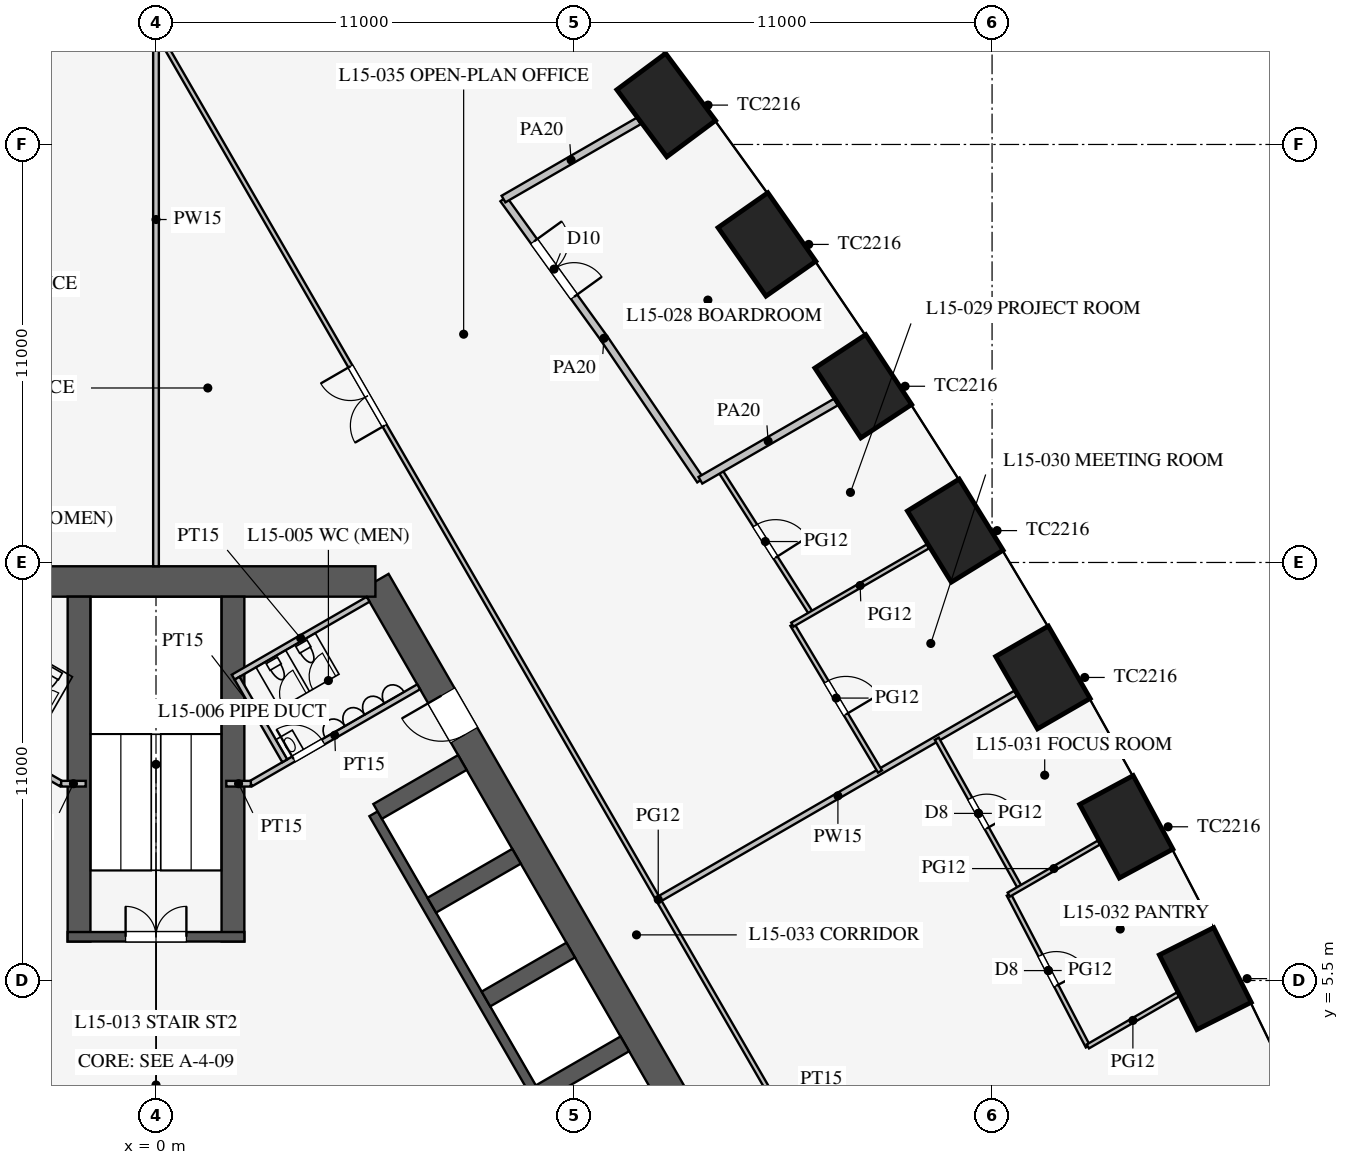
"""IFC4 building model, lengths in metres.
Left out: names, types, materials, properties, quantities, classifications, styles, units other than length and angle.
Written with IfcOpenShell. Run it as: python <this file> out.ifc"""

import sys

from ifc_helpers import new_model, si_unit, direction, frame, frame_2d, origin, origin_2d, place, context, subcontext, project, spatial, rectangle, extrude, element, fill, save


model = new_model("IFC4")
c1 = context("Model", 3, precision=1e-05, world=origin(), true_north=direction((0.0, 1.0)))
c2 = subcontext(c1, "Body", "Model", "MODEL_VIEW")
j1 = project(units=[si_unit("LENGTHUNIT", "METRE"), si_unit("PLANEANGLEUNIT", "RADIAN")], contexts=[c1])
p1 = place(None, origin())
s1 = spatial("IfcSite", under=j1, at=p1, CompositionType="ELEMENT")
p2 = place(p1, origin())
s2 = spatial("IfcBuilding", under=s1, at=p2, CompositionType="ELEMENT")
p3 = place(p2, frame((0.0, 0.0, 66.9)))
s3 = spatial("IfcBuildingStorey", under=s2, at=p3, CompositionType="ELEMENT", Elevation=66.9)
for number, where, z_axis, x_axis in (
    (1, (29.576, 1.487, 0.0), (0.0, 0.0, 1.0), (-0.423, 0.906, 0.0)),
    (2, (27.611, 5.549, 0.0), (0.0, 0.0, 1.0), (-0.449, 0.894, 0.0)),
    (3, (25.531, 9.544, 0.0), (0.0, 0.0, 1.0), (-0.475, 0.88, 0.0)),
    (4, (23.338, 13.474, 0.0), (0.0, 0.0, 1.0), (-0.5, 0.866, 0.0)),
    (5, (21.031, 17.339, 0.0), (0.0, 0.0, 1.0), (-0.525, 0.851, 0.0)),
    (6, (18.611, 21.137, 0.0), (0.0, 0.0, 1.0), (-0.549, 0.836, 0.0)),
    (7, (16.076, 24.87, 0.0), (0.0, 0.0, 1.0), (-0.574, 0.819, 0.0)),
    (8, (13.426, 28.536, 0.0), (0.0, 0.0, 1.0), (-0.597, 0.802, 0.0)),
):
    element("IfcColumn", number, at=place(p3, frame(where, z_axis=z_axis, x_axis=x_axis)), inside=s3, PredefinedType="COLUMN", context=c2, shape_type="SweptSolid", body=[
        extrude(rectangle(XDim=2.2, YDim=1.6, at=origin_2d()), origin(), (0.0, 0.0, 1.0), 4.2),
    ])
p4 = place(p3, frame((16.743, -3.0, 0.0), z_axis=(0.0, 0.0, 1.0), x_axis=(-0.500002442456, 0.866023993627, 0.0)))
e9 = element("IfcWall", 9, at=p4, inside=s3, PredefinedType="SHEAR", context=c2, shape_type="SweptSolid", body=[
    extrude(rectangle(XDim=21.939, YDim=0.8, at=frame_2d((10.97, 0.0))), origin(), (0.0, 0.0, 1.0), 4.2),
])
p5 = place(p4, frame((17.27, 0.0, 0.0)))
e10 = element("IfcOpeningElement", 10, at=p5, cuts=e9, PredefinedType="OPENING", context=c2, shape_type="SweptSolid", body=[
    extrude(rectangle(XDim=1.2, YDim=2.1, at=frame_2d((0.6, 1.05))), frame((0.0, 0.41, 0.0), z_axis=(0.0, -1.0, 0.0), x_axis=(1.0, 0.0, 0.0)), (0.0, 0.0, 1.0), 0.82),
])
p6 = place(p4, frame((3.47, 0.0, 0.0)))
e11 = element("IfcOpeningElement", 11, at=p6, cuts=e9, PredefinedType="OPENING", context=c2, shape_type="SweptSolid", body=[
    extrude(rectangle(XDim=1.2, YDim=2.1, at=frame_2d((0.6, 1.05))), frame((0.0, 0.41, 0.0), z_axis=(0.0, -1.0, 0.0), x_axis=(1.0, 0.0, 0.0)), (0.0, 0.0, 1.0), 0.82),
])
p7 = place(p3, frame((5.773, 16.0, 0.0), z_axis=(0.0, 0.0, 1.0), x_axis=(-1.0, 0.0, 0.0)))
e12 = element("IfcWall", 12, at=p7, inside=s3, PredefinedType="SHEAR", context=c2, shape_type="SweptSolid", body=[
    extrude(rectangle(XDim=11.547, YDim=0.8, at=frame_2d((5.773, 0.0))), origin(), (0.0, 0.0, 1.0), 4.2),
])
p8 = place(p3, frame((11.424, 0.014, 0.0), z_axis=(0.0, 0.0, 1.0), x_axis=(-0.500001763848, 0.866024385424, 0.0)))
e13 = element("IfcWall", 13, at=p8, inside=s3, PredefinedType="SHEAR", context=c2, shape_type="SweptSolid", body=[
    extrude(rectangle(XDim=11.4, YDim=0.25, at=frame_2d((5.7, 0.0))), origin(), (0.0, 0.0, 1.0), 4.2),
])
for number, where, z_axis, x_axis in (
    (14, (10.107, 2.544, 0.0), (0.0, 0.0, 1.0), (0.866, 0.5, 0.0)),
    (15, (8.682, 5.012, 0.0), (0.0, 0.0, 1.0), (0.866, 0.5, 0.0)),
    (16, (7.257, 7.481, 0.0), (0.0, 0.0, 1.0), (0.866, 0.5, 0.0)),
):
    element("IfcWall", number, at=place(p3, frame(where, z_axis=z_axis, x_axis=x_axis)), inside=s3, PredefinedType="SHEAR", context=c2, shape_type="SweptSolid", body=[
        extrude(rectangle(XDim=2.575, YDim=0.45, at=frame_2d((1.288, 0.0))), origin(), (0.0, 0.0, 1.0), 4.2),
    ])
p9 = place(p3, frame((5.832, 9.949, 0.0), z_axis=(0.0, 0.0, 1.0), x_axis=(0.866029291668, 0.499993265928, 0.0)))
e17 = element("IfcWall", 17, at=p9, inside=s3, PredefinedType="SHEAR", context=c2, shape_type="SweptSolid", body=[
    extrude(rectangle(XDim=2.575, YDim=0.45, at=frame_2d((1.288, 0.0))), origin(), (0.0, 0.0, 1.0), 4.2),
])
for number, where, z_axis, x_axis in (
    (18, (2.025, 6.525, 0.0), (0.0, 0.0, 1.0), (0.0, 1.0, 0.0)),
    (19, (-2.025, 6.525, 0.0), (0.0, 0.0, 1.0), (0.0, 1.0, 0.0)),
):
    element("IfcWall", number, at=place(p3, frame(where, z_axis=z_axis, x_axis=x_axis)), inside=s3, PredefinedType="SHEAR", context=c2, shape_type="SweptSolid", body=[
        extrude(rectangle(XDim=9.075, YDim=0.6, at=frame_2d((4.538, 0.0))), origin(), (0.0, 0.0, 1.0), 4.2),
    ])
p10 = place(p3, frame((2.325, 6.65, 0.0), z_axis=(0.0, 0.0, 1.0), x_axis=(-1.0, 0.0, 0.0)))
e20 = element("IfcWall", 20, at=p10, inside=s3, PredefinedType="SHEAR", context=c2, shape_type="SweptSolid", body=[
    extrude(rectangle(XDim=4.65, YDim=0.25, at=frame_2d((2.325, 0.0))), origin(), (0.0, 0.0, 1.0), 4.2),
])
p11 = place(p10, frame((1.525, 0.0, 0.0)))
e21 = element("IfcOpeningElement", 21, at=p11, cuts=e20, PredefinedType="OPENING", context=c2, shape_type="SweptSolid", body=[
    extrude(rectangle(XDim=1.6, YDim=2.1, at=frame_2d((0.8, 1.05))), frame((0.0, 0.135, 0.0), z_axis=(0.0, -1.0, 0.0), x_axis=(1.0, 0.0, 0.0)), (0.0, 0.0, 1.0), 0.27),
])
p12 = place(p3, frame((2.495, 10.678, 0.0), z_axis=(0.0, 0.0, 1.0), x_axis=(0.86602216432, 0.500005610874, 0.0)))
e22 = element("IfcWall", 22, at=p12, inside=s3, PredefinedType="PARTITIONING", context=c2, shape_type="SweptSolid", body=[
    extrude(rectangle(XDim=5.1, YDim=0.15, at=frame_2d((2.55, 0.0))), origin(), (0.0, 0.0, 1.0), 4.0),
])
p13 = place(p12, frame((1.3, 0.0, 0.0)))
e23 = element("IfcOpeningElement", 23, at=p13, cuts=e22, PredefinedType="OPENING", context=c2, shape_type="SweptSolid", body=[
    extrude(rectangle(XDim=0.9, YDim=2.1, at=frame_2d((0.45, 1.05))), frame((0.0, 0.085, 0.0), z_axis=(0.0, -1.0, 0.0), x_axis=(1.0, 0.0, 0.0)), (0.0, 0.0, 1.0), 0.17),
])
p14 = place(p3, frame((-2.495, 10.678, 0.0), z_axis=(0.0, 0.0, 1.0), x_axis=(-0.86602216432, 0.500005610874, 0.0)))
e24 = element("IfcWall", 24, at=p14, inside=s3, PredefinedType="PARTITIONING", context=c2, shape_type="SweptSolid", body=[
    extrude(rectangle(XDim=5.1, YDim=0.15, at=frame_2d((2.55, 0.0))), origin(), (0.0, 0.0, 1.0), 4.0),
])
p15 = place(p14, frame((2.6, 0.0, 0.0)))
e25 = element("IfcOpeningElement", 25, at=p15, cuts=e24, PredefinedType="OPENING", context=c2, shape_type="SweptSolid", body=[
    extrude(rectangle(XDim=0.9, YDim=2.1, at=frame_2d((0.45, 1.05))), frame((0.0, 0.085, 0.0), z_axis=(0.0, -1.0, 0.0), x_axis=(1.0, 0.0, 0.0)), (0.0, 0.0, 1.0), 0.17),
])
for number, where, z_axis, x_axis in (
    (26, (2.495, 10.678, 0.0), (0.0, 0.0, 1.0), (-1.0, 0.0, 0.0)),
    (27, (-2.495, 10.678, 0.0), (0.0, 0.0, 1.0), (1.0, 0.0, 0.0)),
):
    element("IfcWall", number, at=place(p3, frame(where, z_axis=z_axis, x_axis=x_axis)), inside=s3, PredefinedType="PARTITIONING", context=c2, shape_type="SweptSolid", body=[
        extrude(rectangle(XDim=0.645, YDim=0.15, at=frame_2d((0.323, 0.0))), origin(), (0.0, 0.0, 1.0), 4.0),
    ])
p16 = place(p3, frame((2.031, 13.482, 0.0), z_axis=(0.0, 0.0, 1.0), x_axis=(0.866050731258, 0.499956128963, 0.0)))
e28 = element("IfcWall", 28, at=p16, inside=s3, PredefinedType="PARTITIONING", context=c2, shape_type="SweptSolid", body=[
    extrude(rectangle(XDim=4.1, YDim=0.15, at=frame_2d((2.05, 0.0))), origin(), (0.0, 0.0, 1.0), 4.0),
])
p17 = place(p3, frame((3.389, 11.281, 0.0), z_axis=(0.0, 0.0, 1.0), x_axis=(-0.499989096993, 0.866031698547, 0.0)))
e29 = element("IfcWall", 29, at=p17, inside=s3, PredefinedType="PARTITIONING", context=c2, shape_type="SweptSolid", body=[
    extrude(rectangle(XDim=2.51, YDim=0.15, at=frame_2d((1.255, 0.0))), origin(), (0.0, 0.0, 1.0), 4.0),
])
p18 = place(p3, frame((0.0, 16.4, 0.0), z_axis=(0.0, 0.0, 1.0), x_axis=(0.0, 1.0, 0.0)))
e30 = element("IfcWall", 30, at=p18, inside=s3, PredefinedType="PARTITIONING", context=c2, shape_type="SweptSolid", body=[
    extrude(rectangle(XDim=18.25, YDim=0.15, at=frame_2d((9.125, 0.0))), origin(), (0.0, 0.0, 1.0), 2.3),
])
p19 = place(p3, frame((13.268, 7.66, 0.0), z_axis=(0.0, 0.0, 1.0), x_axis=(0.866019550038, 0.50001013885, 0.0)))
e31 = element("IfcWall", 31, at=p19, inside=s3, PredefinedType="PARTITIONING", context=c2, shape_type="SweptSolid", body=[
    extrude(rectangle(XDim=10.799, YDim=0.15, at=frame_2d((5.399, 0.0))), origin(), (0.0, 0.0, 1.0), 2.8),
])
p20 = place(p3, frame((26.415, -15.231, 0.0), z_axis=(0.0, 0.0, 1.0), x_axis=(-0.50000091641, 0.866024874695, 0.0)))
e32 = element("IfcWall", 32, at=p20, inside=s3, PredefinedType="PARTITIONING", context=c2, shape_type="SweptSolid", body=[
    extrude(rectangle(XDim=52.796, YDim=0.12, at=frame_2d((26.398, 0.0))), origin(), (0.0, 0.0, 1.0), 2.9),
])
p21 = place(p20, frame((10.2, 0.0, 0.15)))
e33 = element("IfcOpeningElement", 33, at=p21, cuts=e32, PredefinedType="OPENING", context=c2, shape_type="SweptSolid", body=[
    extrude(rectangle(XDim=1.8, YDim=2.1, at=frame_2d((0.9, 1.05))), frame((0.0, 0.07, 0.0), z_axis=(0.0, -1.0, 0.0), x_axis=(1.0, 0.0, 0.0)), (0.0, 0.0, 1.0), 0.14),
])
p22 = place(p20, frame((40.8, 0.0, 0.15)))
e34 = element("IfcOpeningElement", 34, at=p22, cuts=e32, PredefinedType="OPENING", context=c2, shape_type="SweptSolid", body=[
    extrude(rectangle(XDim=1.8, YDim=2.1, at=frame_2d((0.9, 1.05))), frame((0.0, 0.07, 0.0), z_axis=(0.0, -1.0, 0.0), x_axis=(1.0, 0.0, 0.0)), (0.0, 0.0, 1.0), 0.14),
])
p23 = place(p3, frame((19.052, 10.999, 0.0), z_axis=(0.0, 0.0, 1.0), x_axis=(-0.51252396108, 0.858672923364, 0.0)))
e35 = element("IfcWall", 35, at=p23, inside=s3, PredefinedType="PARTITIONING", context=c2, shape_type="SweptSolid", body=[
    extrude(rectangle(XDim=4.5, YDim=0.12, at=frame_2d((2.25, 0.0))), origin(), (0.0, 0.0, 1.0), 2.9),
])
p24 = place(p23, frame((1.75, 0.0, 0.15)))
e36 = element("IfcOpeningElement", 36, at=p24, cuts=e35, PredefinedType="OPENING", context=c2, shape_type="SweptSolid", body=[
    extrude(rectangle(XDim=1.0, YDim=2.1, at=frame_2d((0.5, 1.05))), frame((0.0, 0.07, 0.0), z_axis=(0.0, -1.0, 0.0), x_axis=(1.0, 0.0, 0.0)), (0.0, 0.0, 1.0), 0.14),
])
p25 = place(p3, frame((11.792, 22.396, 0.0), z_axis=(0.0, 0.0, 1.0), x_axis=(-0.585376255171, 0.810761765183, 0.0)))
e37 = element("IfcWall", 37, at=p25, inside=s3, PredefinedType="PARTITIONING", context=c2, shape_type="SweptSolid", body=[
    extrude(rectangle(XDim=4.523, YDim=0.2, at=frame_2d((2.262, 0.0))), origin(), (0.0, 0.0, 1.0), 2.9),
])
p26 = place(p25, frame((1.35, 0.0, 0.15)))
e38 = element("IfcOpeningElement", 38, at=p26, cuts=e37, PredefinedType="OPENING", context=c2, shape_type="SweptSolid", body=[
    extrude(rectangle(XDim=1.8, YDim=2.1, at=frame_2d((0.9, 1.05))), frame((0.0, 0.11, 0.0), z_axis=(0.0, -1.0, 0.0), x_axis=(1.0, 0.0, 0.0)), (0.0, 0.0, 1.0), 0.22),
])
p27 = place(p3, frame((17.243, 15.151, 0.0), z_axis=(0.0, 0.0, 1.0), x_axis=(-0.537243691336, 0.843427066272, 0.0)))
e39 = element("IfcWall", 39, at=p27, inside=s3, PredefinedType="PARTITIONING", context=c2, shape_type="SweptSolid", body=[
    extrude(rectangle(XDim=4.504, YDim=0.12, at=frame_2d((2.252, 0.0))), origin(), (0.0, 0.0, 1.0), 2.9),
])
p28 = place(p27, frame((1.75, 0.0, 0.15)))
e40 = element("IfcOpeningElement", 40, at=p28, cuts=e39, PredefinedType="OPENING", context=c2, shape_type="SweptSolid", body=[
    extrude(rectangle(XDim=1.0, YDim=2.1, at=frame_2d((0.5, 1.05))), frame((0.0, 0.07, 0.0), z_axis=(0.0, -1.0, 0.0), x_axis=(1.0, 0.0, 0.0)), (0.0, 0.0, 1.0), 0.14),
])
p29 = place(p3, frame((14.325, 18.663, 0.0), z_axis=(0.0, 0.0, 1.0), x_axis=(-0.561512004239, 0.827468591002, 0.0)))
e41 = element("IfcWall", 41, at=p29, inside=s3, PredefinedType="PARTITIONING", context=c2, shape_type="SweptSolid", body=[
    extrude(rectangle(XDim=4.512, YDim=0.2, at=frame_2d((2.256, 0.0))), origin(), (0.0, 0.0, 1.0), 2.9),
])
p30 = place(p3, frame((22.739, 7.932, 0.0), z_axis=(0.0, 0.0, 1.0), x_axis=(-0.487373854787, 0.873193406795, 0.0)))
e42 = element("IfcWall", 42, at=p30, inside=s3, PredefinedType="PARTITIONING", context=c2, shape_type="SweptSolid", body=[
    extrude(rectangle(XDim=4.5, YDim=0.12, at=frame_2d((2.25, 0.0))), origin(), (0.0, 0.0, 1.0), 2.9),
])
p31 = place(p30, frame((1.8, 0.0, 0.15)))
e43 = element("IfcOpeningElement", 43, at=p31, cuts=e42, PredefinedType="OPENING", context=c2, shape_type="SweptSolid", body=[
    extrude(rectangle(XDim=0.9, YDim=2.1, at=frame_2d((0.45, 1.05))), frame((0.0, 0.07, 0.0), z_axis=(0.0, -1.0, 0.0), x_axis=(1.0, 0.0, 0.0)), (0.0, 0.0, 1.0), 0.14),
])
p32 = place(p3, frame((24.52, 3.764, 0.0), z_axis=(0.0, 0.0, 1.0), x_axis=(-0.461852697957, 0.886956642339, 0.0)))
e44 = element("IfcWall", 44, at=p32, inside=s3, PredefinedType="PARTITIONING", context=c2, shape_type="SweptSolid", body=[
    extrude(rectangle(XDim=4.504, YDim=0.12, at=frame_2d((2.252, 0.0))), origin(), (0.0, 0.0, 1.0), 2.9),
])
p33 = place(p32, frame((1.8, 0.0, 0.15)))
e45 = element("IfcOpeningElement", 45, at=p33, cuts=e44, PredefinedType="OPENING", context=c2, shape_type="SweptSolid", body=[
    extrude(rectangle(XDim=0.9, YDim=2.1, at=frame_2d((0.45, 1.05))), frame((0.0, 0.07, 0.0), z_axis=(0.0, -1.0, 0.0), x_axis=(1.0, 0.0, 0.0)), (0.0, 0.0, 1.0), 0.14),
])
p34 = place(p3, frame((9.144, 26.064, 0.0), z_axis=(0.0, 0.0, 1.0), x_axis=(0.866022320763, 0.500005339912, 0.0)))
e46 = element("IfcWall", 46, at=p34, inside=s3, PredefinedType="PARTITIONING", context=c2, shape_type="SweptSolid", body=[
    extrude(rectangle(XDim=4.109, YDim=0.2, at=frame_2d((2.054, 0.0))), origin(), (0.0, 0.0, 1.0), 2.6),
])
p35 = place(p3, frame((16.745, 14.864, 0.0), z_axis=(0.0, 0.0, 1.0), x_axis=(0.8660059538, 0.500033686847, 0.0)))
e47 = element("IfcWall", 47, at=p35, inside=s3, PredefinedType="PARTITIONING", context=c2, shape_type="SweptSolid", body=[
    extrude(rectangle(XDim=4.119, YDim=0.12, at=frame_2d((2.06, 0.0))), origin(), (0.0, 0.0, 1.0), 2.8),
])
p36 = place(p3, frame((14.325, 18.663, 0.0), z_axis=(0.0, 0.0, 1.0), x_axis=(0.866030556495, 0.499991075137, 0.0)))
e48 = element("IfcWall", 48, at=p36, inside=s3, PredefinedType="PARTITIONING", context=c2, shape_type="SweptSolid", body=[
    extrude(rectangle(XDim=4.117, YDim=0.2, at=frame_2d((2.059, 0.0))), origin(), (0.0, 0.0, 1.0), 2.8),
])
p37 = place(p3, frame((22.44, 7.76, 0.0), z_axis=(0.0, 0.0, 1.0), x_axis=(0.866029747927, 0.499992475648, 0.0)))
e49 = element("IfcWall", 49, at=p37, inside=s3, PredefinedType="PARTITIONING", context=c2, shape_type="SweptSolid", body=[
    extrude(rectangle(XDim=2.739, YDim=0.12, at=frame_2d((1.37, 0.0))), origin(), (0.0, 0.0, 1.0), 2.8),
])
p38 = place(p3, frame((24.52, 3.764, 0.0), z_axis=(0.0, 0.0, 1.0), x_axis=(0.866028150195, 0.499995243048, 0.0)))
e50 = element("IfcWall", 50, at=p38, inside=s3, PredefinedType="PARTITIONING", context=c2, shape_type="SweptSolid", body=[
    extrude(rectangle(XDim=2.737, YDim=0.12, at=frame_2d((1.369, 0.0))), origin(), (0.0, 0.0, 1.0), 2.8),
])
p39 = place(p13, origin())
e51 = element("IfcDoor", 51, at=p39, inside=s3, OperationType="SINGLE_SWING_LEFT", PredefinedType="DOOR", context=c2, shape_type="SweptSolid", body=[
    extrude(rectangle(XDim=0.9, YDim=2.1, at=frame_2d((0.45, 1.05))), frame((0.0, 0.025, 0.0), z_axis=(0.0, -1.0, 0.0), x_axis=(1.0, 0.0, 0.0)), (0.0, 0.0, 1.0), 0.05),
])
fill(e23, e51)
p40 = place(p11, frame((1.6, 0.0, 0.0), z_axis=(0.0, 0.0, 1.0), x_axis=(-1.0, 0.0, 0.0)))
e52 = element("IfcDoor", 52, at=p40, inside=s3, OperationType="DOUBLE_DOOR_SINGLE_SWING", PredefinedType="DOOR", context=c2, shape_type="SweptSolid", body=[
    extrude(rectangle(XDim=1.6, YDim=2.1, at=frame_2d((0.8, 1.05))), frame((0.0, 0.025, 0.0), z_axis=(0.0, -1.0, 0.0), x_axis=(1.0, 0.0, 0.0)), (0.0, 0.0, 1.0), 0.05),
])
fill(e21, e52)
p41 = place(p5, origin())
e53 = element("IfcDoor", 53, at=p41, inside=s3, OperationType="SINGLE_SWING_RIGHT", PredefinedType="DOOR", context=c2, shape_type="SweptSolid", body=[
    extrude(rectangle(XDim=1.2, YDim=2.1, at=frame_2d((0.6, 1.05))), frame((0.0, 0.025, 0.0), z_axis=(0.0, -1.0, 0.0), x_axis=(1.0, 0.0, 0.0)), (0.0, 0.0, 1.0), 0.05),
])
fill(e10, e53)
p42 = place(p26, frame((1.8, 0.0, 0.0), z_axis=(0.0, 0.0, 1.0), x_axis=(-1.0, 0.0, 0.0)))
e54 = element("IfcDoor", 54, at=p42, inside=s3, OperationType="DOUBLE_DOOR_SINGLE_SWING", PredefinedType="DOOR", context=c2, shape_type="SweptSolid", body=[
    extrude(rectangle(XDim=1.8, YDim=2.1, at=frame_2d((0.9, 1.05))), frame((0.0, 0.025, 0.0), z_axis=(0.0, -1.0, 0.0), x_axis=(1.0, 0.0, 0.0)), (0.0, 0.0, 1.0), 0.05),
])
fill(e38, e54)
p43 = place(p28, frame((1.0, 0.0, 0.0), z_axis=(0.0, 0.0, 1.0), x_axis=(-1.0, 0.0, 0.0)))
e55 = element("IfcDoor", 55, at=p43, inside=s3, OperationType="SINGLE_SWING_RIGHT", PredefinedType="DOOR", context=c2, shape_type="SweptSolid", body=[
    extrude(rectangle(XDim=1.0, YDim=2.1, at=frame_2d((0.5, 1.05))), frame((0.0, 0.025, 0.0), z_axis=(0.0, -1.0, 0.0), x_axis=(1.0, 0.0, 0.0)), (0.0, 0.0, 1.0), 0.05),
])
fill(e40, e55)
p44 = place(p24, frame((1.0, 0.0, 0.0), z_axis=(0.0, 0.0, 1.0), x_axis=(-1.0, 0.0, 0.0)))
e56 = element("IfcDoor", 56, at=p44, inside=s3, OperationType="SINGLE_SWING_RIGHT", PredefinedType="DOOR", context=c2, shape_type="SweptSolid", body=[
    extrude(rectangle(XDim=1.0, YDim=2.1, at=frame_2d((0.5, 1.05))), frame((0.0, 0.025, 0.0), z_axis=(0.0, -1.0, 0.0), x_axis=(1.0, 0.0, 0.0)), (0.0, 0.0, 1.0), 0.05),
])
fill(e36, e56)
p45 = place(p31, frame((0.9, 0.0, 0.0), z_axis=(0.0, 0.0, 1.0), x_axis=(-1.0, 0.0, 0.0)))
e57 = element("IfcDoor", 57, at=p45, inside=s3, OperationType="SINGLE_SWING_RIGHT", PredefinedType="DOOR", context=c2, shape_type="SweptSolid", body=[
    extrude(rectangle(XDim=0.9, YDim=2.1, at=frame_2d((0.45, 1.05))), frame((0.0, 0.025, 0.0), z_axis=(0.0, -1.0, 0.0), x_axis=(1.0, 0.0, 0.0)), (0.0, 0.0, 1.0), 0.05),
])
fill(e43, e57)
p46 = place(p33, frame((0.9, 0.0, 0.0), z_axis=(0.0, 0.0, 1.0), x_axis=(-1.0, 0.0, 0.0)))
e58 = element("IfcDoor", 58, at=p46, inside=s3, OperationType="SINGLE_SWING_RIGHT", PredefinedType="DOOR", context=c2, shape_type="SweptSolid", body=[
    extrude(rectangle(XDim=0.9, YDim=2.1, at=frame_2d((0.45, 1.05))), frame((0.0, 0.025, 0.0), z_axis=(0.0, -1.0, 0.0), x_axis=(1.0, 0.0, 0.0)), (0.0, 0.0, 1.0), 0.05),
])
fill(e45, e58)
p47 = place(p22, origin())
e59 = element("IfcDoor", 59, at=p47, inside=s3, OperationType="DOUBLE_DOOR_SINGLE_SWING", PredefinedType="DOOR", context=c2, shape_type="SweptSolid", body=[
    extrude(rectangle(XDim=1.8, YDim=2.1, at=frame_2d((0.9, 1.05))), frame((0.0, 0.025, 0.0), z_axis=(0.0, -1.0, 0.0), x_axis=(1.0, 0.0, 0.0)), (0.0, 0.0, 1.0), 0.05),
])
fill(e34, e59)
save(model, sys.argv[1])
